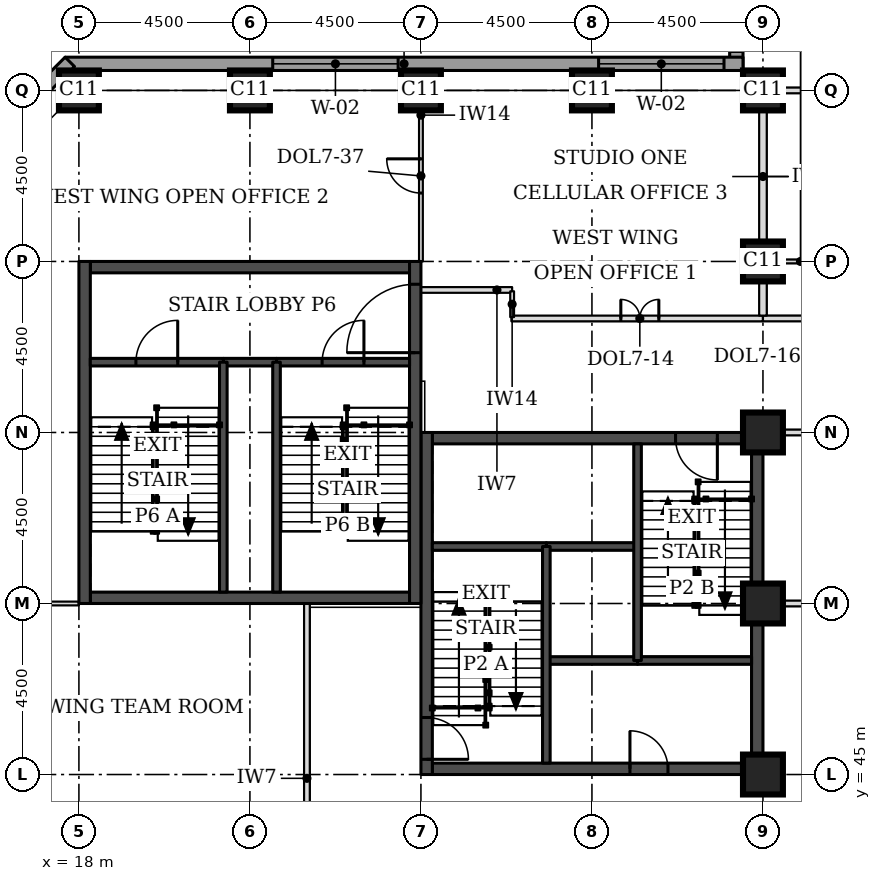
"""IFC4 building model, lengths in metres.
Left out: names, types, materials, properties, quantities, classifications, styles, units other than length and angle.
Written with IfcOpenShell. Run it as: python <this file> out.ifc"""

import sys

from ifc_helpers import new_model, si_unit, direction, frame, frame_2d, origin, origin_2d, place, context, subcontext, project, spatial, rectangle, extrude, element, fill, save


model = new_model("IFC4")
c1 = context("Model", 3, precision=1e-05, world=origin(), true_north=direction((0.0, 1.0)))
c2 = subcontext(c1, "Body", "Model", "MODEL_VIEW")
j1 = project(units=[si_unit("LENGTHUNIT", "METRE"), si_unit("PLANEANGLEUNIT", "RADIAN")], contexts=[c1])
p1 = place(None, origin())
s1 = spatial("IfcSite", under=j1, at=p1, CompositionType="ELEMENT")
p2 = place(p1, origin())
s2 = spatial("IfcBuilding", under=s1, at=p2, CompositionType="ELEMENT")
p3 = place(p2, frame((0.0, 0.0, 134.4)))
s3 = spatial("IfcBuildingStorey", under=s2, at=p3, CompositionType="ELEMENT", Elevation=134.4)
for number, where, z_axis, x_axis in (
    (1, (36.0, 45.0, 0.0), (0.0, 0.0, 1.0), (1.0, 0.0, 0.0)),
    (2, (36.0, 49.5, 0.0), (0.0, 0.0, 1.0), (1.0, 0.0, 0.0)),
    (3, (36.0, 54.0, 0.0), (0.0, 0.0, 1.0), (1.0, 0.0, 0.0)),
    (4, (36.0, 58.5, 0.0), (0.0, 0.0, 1.0), (1.0, 0.0, 0.0)),
    (5, (18.0, 63.0, 0.0), (0.0, 0.0, 1.0), (1.0, 0.0, 0.0)),
    (6, (22.5, 63.0, 0.0), (0.0, 0.0, 1.0), (1.0, 0.0, 0.0)),
    (7, (27.0, 63.0, 0.0), (0.0, 0.0, 1.0), (1.0, 0.0, 0.0)),
    (8, (31.5, 63.0, 0.0), (0.0, 0.0, 1.0), (1.0, 0.0, 0.0)),
    (9, (36.0, 63.0, 0.0), (0.0, 0.0, 1.0), (1.0, 0.0, 0.0)),
):
    element("IfcColumn", number, at=place(p3, frame(where, z_axis=z_axis, x_axis=x_axis)), inside=s3, PredefinedType="COLUMN", context=c2, shape_type="SweptSolid", body=[
        extrude(rectangle(XDim=1.05, YDim=1.05, at=origin_2d()), origin(), (0.0, 0.0, 1.0), 3.7),
    ])
p4 = place(p3, frame((27.3, 45.15, 0.0), z_axis=(0.0, 0.0, 1.0), x_axis=(1.0, 0.0, 0.0)))
e10 = element("IfcWall", 10, at=p4, inside=s3, PredefinedType="SHEAR", context=c2, shape_type="SweptSolid", body=[
    extrude(rectangle(XDim=8.4, YDim=0.3, at=frame_2d((4.2, 0.0))), origin(), (0.0, 0.0, 1.0), 3.7),
])
p5 = place(p4, frame((5.2, 0.0, 0.0)))
e11 = element("IfcOpeningElement", 11, at=p5, cuts=e10, PredefinedType="OPENING", context=c2, shape_type="SweptSolid", body=[
    extrude(rectangle(XDim=1.0, YDim=2.1, at=frame_2d((0.5, 1.05))), frame((0.0, 0.16, 0.0), z_axis=(0.0, -1.0, 0.0), x_axis=(1.0, 0.0, 0.0)), (0.0, 0.0, 1.0), 0.32),
])
p6 = place(p3, frame((27.3, 53.85, 0.0), z_axis=(0.0, 0.0, 1.0), x_axis=(1.0, 0.0, 0.0)))
e12 = element("IfcWall", 12, at=p6, inside=s3, PredefinedType="SHEAR", context=c2, shape_type="SweptSolid", body=[
    extrude(rectangle(XDim=8.4, YDim=0.3, at=frame_2d((4.2, 0.0))), origin(), (0.0, 0.0, 1.0), 3.7),
])
p7 = place(p6, frame((6.4, 0.0, 0.0)))
e13 = element("IfcOpeningElement", 13, at=p7, cuts=e12, PredefinedType="OPENING", context=c2, shape_type="SweptSolid", body=[
    extrude(rectangle(XDim=1.1, YDim=2.1, at=frame_2d((0.55, 1.05))), frame((0.0, 0.16, 0.0), z_axis=(0.0, -1.0, 0.0), x_axis=(1.0, 0.0, 0.0)), (0.0, 0.0, 1.0), 0.32),
])
p8 = place(p3, frame((27.15, 45.0, 0.0), z_axis=(0.0, 0.0, 1.0), x_axis=(0.0, 1.0, 0.0)))
e14 = element("IfcWall", 14, at=p8, inside=s3, PredefinedType="SHEAR", context=c2, shape_type="SweptSolid", body=[
    extrude(rectangle(XDim=9.0, YDim=0.3, at=frame_2d((4.5, 0.0))), origin(), (0.0, 0.0, 1.0), 3.7),
])
p9 = place(p8, frame((0.4, 0.0, 0.0)))
e15 = element("IfcOpeningElement", 15, at=p9, cuts=e14, PredefinedType="OPENING", context=c2, shape_type="SweptSolid", body=[
    extrude(rectangle(XDim=1.1, YDim=2.1, at=frame_2d((0.55, 1.05))), frame((0.0, 0.16, 0.0), z_axis=(0.0, -1.0, 0.0), x_axis=(1.0, 0.0, 0.0)), (0.0, 0.0, 1.0), 0.32),
])
p10 = place(p3, frame((35.85, 45.0, 0.0), z_axis=(0.0, 0.0, 1.0), x_axis=(0.0, 1.0, 0.0)))
e16 = element("IfcWall", 16, at=p10, inside=s3, PredefinedType="SHEAR", context=c2, shape_type="SweptSolid", body=[
    extrude(rectangle(XDim=9.0, YDim=0.3, at=frame_2d((4.5, 0.0))), origin(), (0.0, 0.0, 1.0), 3.7),
])
for number, where, z_axis, x_axis in (
    (17, (18.3, 49.65, 0.0), (0.0, 0.0, 1.0), (1.0, 0.0, 0.0)),
    (18, (18.3, 58.35, 0.0), (0.0, 0.0, 1.0), (1.0, 0.0, 0.0)),
):
    element("IfcWall", number, at=place(p3, frame(where, z_axis=z_axis, x_axis=x_axis)), inside=s3, PredefinedType="SHEAR", context=c2, shape_type="SweptSolid", body=[
        extrude(rectangle(XDim=8.4, YDim=0.3, at=frame_2d((4.2, 0.0))), origin(), (0.0, 0.0, 1.0), 3.7),
    ])
p11 = place(p3, frame((18.15, 49.5, 0.0), z_axis=(0.0, 0.0, 1.0), x_axis=(0.0, 1.0, 0.0)))
e19 = element("IfcWall", 19, at=p11, inside=s3, PredefinedType="SHEAR", context=c2, shape_type="SweptSolid", body=[
    extrude(rectangle(XDim=9.0, YDim=0.3, at=frame_2d((4.5, 0.0))), origin(), (0.0, 0.0, 1.0), 3.7),
])
p12 = place(p3, frame((26.85, 49.5, 0.0), z_axis=(0.0, 0.0, 1.0), x_axis=(0.0, 1.0, 0.0)))
e20 = element("IfcWall", 20, at=p12, inside=s3, PredefinedType="SHEAR", context=c2, shape_type="SweptSolid", body=[
    extrude(rectangle(XDim=9.0, YDim=0.3, at=frame_2d((4.5, 0.0))), origin(), (0.0, 0.0, 1.0), 3.7),
])
p13 = place(p12, frame((6.6, 0.0, 0.0)))
e21 = element("IfcOpeningElement", 21, at=p13, cuts=e20, PredefinedType="OPENING", context=c2, shape_type="SweptSolid", body=[
    extrude(rectangle(XDim=1.8, YDim=2.1, at=frame_2d((0.9, 1.05))), frame((0.0, 0.16, 0.0), z_axis=(0.0, -1.0, 0.0), x_axis=(1.0, 0.0, 0.0)), (0.0, 0.0, 1.0), 0.32),
])
p14 = place(p3, frame((35.3, 76.862, 0.0), z_axis=(0.0, 0.0, 1.0), x_axis=(0.0, -1.0, 0.0)))
e22 = element("IfcWall", 22, at=p14, inside=s3, PredefinedType="STANDARD", context=c2, shape_type="SweptSolid", body=[
    extrude(rectangle(XDim=13.337, YDim=0.35, at=frame_2d((6.669, 0.0))), origin(), (0.0, 0.0, 1.0), 3.525),
])
p15 = place(p14, frame((9.537, 0.0, 0.9)))
e23 = element("IfcOpeningElement", 23, at=p15, cuts=e22, PredefinedType="OPENING", context=c2, shape_type="SweptSolid", body=[
    extrude(rectangle(XDim=3.3, YDim=1.9, at=frame_2d((1.65, 0.95))), frame((0.0, 0.185, 0.0), z_axis=(0.0, -1.0, 0.0), x_axis=(1.0, 0.0, 0.0)), (0.0, 0.0, 1.0), 0.37),
])
p16 = place(p3, frame((35.475, 63.7, 0.0), z_axis=(0.0, 0.0, 1.0), x_axis=(-1.0, 0.0, 0.0)))
e24 = element("IfcWall", 24, at=p16, inside=s3, PredefinedType="STANDARD", context=c2, shape_type="SweptSolid", body=[
    extrude(rectangle(XDim=17.837, YDim=0.35, at=frame_2d((8.919, 0.0))), origin(), (0.0, 0.0, 1.0), 3.525),
])
p17 = place(p16, frame((0.5, 0.0, 0.9)))
e25 = element("IfcOpeningElement", 25, at=p17, cuts=e24, PredefinedType="OPENING", context=c2, shape_type="SweptSolid", body=[
    extrude(rectangle(XDim=3.3, YDim=1.9, at=frame_2d((1.65, 0.95))), frame((0.0, 0.185, 0.0), z_axis=(0.0, -1.0, 0.0), x_axis=(1.0, 0.0, 0.0)), (0.0, 0.0, 1.0), 0.37),
])
p18 = place(p16, frame((9.075, 0.0, 0.9)))
e26 = element("IfcOpeningElement", 26, at=p18, cuts=e24, PredefinedType="OPENING", context=c2, shape_type="SweptSolid", body=[
    extrude(rectangle(XDim=3.3, YDim=1.9, at=frame_2d((1.65, 0.95))), frame((0.0, 0.185, 0.0), z_axis=(0.0, -1.0, 0.0), x_axis=(1.0, 0.0, 0.0)), (0.0, 0.0, 1.0), 0.37),
])
p19 = place(p3, frame((17.761, 63.751, 0.0), z_axis=(0.0, 0.0, 1.0), x_axis=(-0.707106781187, -0.707106781187, 0.0)))
e27 = element("IfcWall", 27, at=p19, inside=s3, PredefinedType="STANDARD", context=c2, shape_type="SweptSolid", body=[
    extrude(rectangle(XDim=7.089, YDim=0.35, at=frame_2d((3.544, 0.0))), origin(), (0.0, 0.0, 1.0), 3.525),
])
p20 = place(p19, frame((1.894, 0.0, 0.9)))
e28 = element("IfcOpeningElement", 28, at=p20, cuts=e27, PredefinedType="OPENING", context=c2, shape_type="SweptSolid", body=[
    extrude(rectangle(XDim=3.3, YDim=1.9, at=frame_2d((1.65, 0.95))), frame((0.0, 0.185, 0.0), z_axis=(0.0, -1.0, 0.0), x_axis=(1.0, 0.0, 0.0)), (0.0, 0.0, 1.0), 0.37),
])
p21 = place(p3, frame((12.749, 44.761, 0.0), z_axis=(0.0, 0.0, 1.0), x_axis=(0.707106781187, -0.707106781187, 0.0)))
e29 = element("IfcWall", 29, at=p21, inside=s3, PredefinedType="STANDARD", context=c2, shape_type="SweptSolid", body=[
    extrude(rectangle(XDim=7.089, YDim=0.35, at=frame_2d((3.544, 0.0))), origin(), (0.0, 0.0, 1.0), 3.525),
])
p22 = place(p21, frame((1.894, 0.0, 0.9)))
e30 = element("IfcOpeningElement", 30, at=p22, cuts=e29, PredefinedType="OPENING", context=c2, shape_type="SweptSolid", body=[
    extrude(rectangle(XDim=3.3, YDim=1.9, at=frame_2d((1.65, 0.95))), frame((0.0, 0.185, 0.0), z_axis=(0.0, -1.0, 0.0), x_axis=(1.0, 0.0, 0.0)), (0.0, 0.0, 1.0), 0.37),
])
for number, where, z_axis, x_axis in (
    (31, (36.525, 49.5, 0.0), (0.0, 0.0, 1.0), (1.0, 0.0, 0.0)),
    (32, (36.525, 54.0, 0.0), (0.0, 0.0, 1.0), (1.0, 0.0, 0.0)),
):
    element("IfcWall", number, at=place(p3, frame(where, z_axis=z_axis, x_axis=x_axis)), inside=s3, PredefinedType="PARTITIONING", context=c2, shape_type="SweptSolid", body=[
        extrude(rectangle(XDim=5.55, YDim=0.15, at=frame_2d((2.775, 0.0))), origin(), (0.0, 0.0, 1.0), 3.55),
    ])
p23 = place(p3, frame((29.38, 57.0, 0.0), z_axis=(0.0, 0.0, 1.0), x_axis=(1.0, 0.0, 0.0)))
e33 = element("IfcWall", 33, at=p23, inside=s3, PredefinedType="PARTITIONING", context=c2, shape_type="SweptSolid", body=[
    extrude(rectangle(XDim=6.62, YDim=0.15, at=frame_2d((3.31, 0.0))), origin(), (0.0, 0.0, 1.0), 3.55),
])
p24 = place(p23, frame((2.88, 0.0, 0.0)))
e34 = element("IfcOpeningElement", 34, at=p24, cuts=e33, PredefinedType="OPENING", context=c2, shape_type="SweptSolid", body=[
    extrude(rectangle(XDim=1.0, YDim=2.1, at=frame_2d((0.5, 1.05))), frame((0.0, 0.085, 0.0), z_axis=(0.0, -1.0, 0.0), x_axis=(1.0, 0.0, 0.0)), (0.0, 0.0, 1.0), 0.17),
])
p25 = place(p3, frame((36.0, 57.0, 0.0), z_axis=(0.0, 0.0, 1.0), x_axis=(1.0, 0.0, 0.0)))
e35 = element("IfcWall", 35, at=p25, inside=s3, PredefinedType="PARTITIONING", context=c2, shape_type="SweptSolid", body=[
    extrude(rectangle(XDim=6.075, YDim=0.15, at=frame_2d((3.038, 0.0))), origin(), (0.0, 0.0, 1.0), 3.55),
])
p26 = place(p25, frame((2.55, 0.0, 0.0)))
e36 = element("IfcOpeningElement", 36, at=p26, cuts=e35, PredefinedType="OPENING", context=c2, shape_type="SweptSolid", body=[
    extrude(rectangle(XDim=1.0, YDim=2.1, at=frame_2d((0.5, 1.05))), frame((0.0, 0.085, 0.0), z_axis=(0.0, -1.0, 0.0), x_axis=(1.0, 0.0, 0.0)), (0.0, 0.0, 1.0), 0.17),
])
p27 = place(p3, frame((36.525, 58.5, 0.0), z_axis=(0.0, 0.0, 1.0), x_axis=(1.0, 0.0, 0.0)))
e37 = element("IfcWall", 37, at=p27, inside=s3, PredefinedType="PARTITIONING", context=c2, shape_type="SweptSolid", body=[
    extrude(rectangle(XDim=2.525, YDim=0.1, at=frame_2d((1.263, 0.0))), origin(), (0.0, 0.0, 1.0), 3.55),
])
p28 = place(p27, frame((0.8, 0.0, 0.0)))
e38 = element("IfcOpeningElement", 38, at=p28, cuts=e37, PredefinedType="OPENING", context=c2, shape_type="SweptSolid", body=[
    extrude(rectangle(XDim=0.9, YDim=2.1, at=frame_2d((0.45, 1.05))), frame((0.0, 0.06, 0.0), z_axis=(0.0, -1.0, 0.0), x_axis=(1.0, 0.0, 0.0)), (0.0, 0.0, 1.0), 0.12),
])
p29 = place(p3, frame((36.525, 63.0, 0.0), z_axis=(0.0, 0.0, 1.0), x_axis=(1.0, 0.0, 0.0)))
e39 = element("IfcWall", 39, at=p29, inside=s3, PredefinedType="PARTITIONING", context=c2, shape_type="SweptSolid", body=[
    extrude(rectangle(XDim=2.4, YDim=0.15, at=frame_2d((1.2, 0.0))), origin(), (0.0, 0.0, 1.0), 3.55),
])
p30 = place(p3, frame((24.0, 43.5, 0.0), z_axis=(0.0, 0.0, 1.0), x_axis=(0.0, 1.0, 0.0)))
e40 = element("IfcWall", 40, at=p30, inside=s3, PredefinedType="PARTITIONING", context=c2, shape_type="SweptSolid", body=[
    extrude(rectangle(XDim=6.0, YDim=0.15, at=frame_2d((3.0, 0.0))), origin(), (0.0, 0.0, 1.0), 3.55),
])
p31 = place(p3, frame((36.0, 57.075, 0.0), z_axis=(0.0, 0.0, 1.0), x_axis=(0.0, 1.0, 0.0)))
e41 = element("IfcWall", 41, at=p31, inside=s3, PredefinedType="PARTITIONING", context=c2, shape_type="SweptSolid", body=[
    extrude(rectangle(XDim=0.9, YDim=0.2, at=frame_2d((0.45, 0.0))), origin(), (0.0, 0.0, 1.0), 2.8),
])
p32 = place(p3, frame((36.0, 58.995, 0.0), z_axis=(0.0, 0.0, 1.0), x_axis=(0.0, 1.0, 0.0)))
e42 = element("IfcWall", 42, at=p32, inside=s3, PredefinedType="PARTITIONING", context=c2, shape_type="SweptSolid", body=[
    extrude(rectangle(XDim=3.48, YDim=0.2, at=frame_2d((1.74, 0.0))), origin(), (0.0, 0.0, 1.0), 2.8),
])
p33 = place(p3, frame((27.0, 63.0, 0.0), z_axis=(0.0, 0.0, 1.0), x_axis=(0.0, -1.0, 0.0)))
e43 = element("IfcWall", 43, at=p33, inside=s3, PredefinedType="PARTITIONING", context=c2, shape_type="SweptSolid", body=[
    extrude(rectangle(XDim=4.5, YDim=0.1, at=frame_2d((2.25, 0.0))), origin(), (0.0, 0.0, 1.0), 3.55),
])
p34 = place(p33, frame((1.8, 0.0, 0.0)))
e44 = element("IfcOpeningElement", 44, at=p34, cuts=e43, PredefinedType="OPENING", context=c2, shape_type="SweptSolid", body=[
    extrude(rectangle(XDim=0.9, YDim=2.1, at=frame_2d((0.45, 1.05))), frame((0.0, 0.06, 0.0), z_axis=(0.0, -1.0, 0.0), x_axis=(1.0, 0.0, 0.0)), (0.0, 0.0, 1.0), 0.12),
])
p35 = place(p3, frame((13.5, 49.5, 0.0), z_axis=(0.0, 0.0, 1.0), x_axis=(1.0, 0.0, 0.0)))
e45 = element("IfcWall", 45, at=p35, inside=s3, PredefinedType="PARTITIONING", context=c2, shape_type="SweptSolid", body=[
    extrude(rectangle(XDim=4.5, YDim=0.1, at=frame_2d((2.25, 0.0))), origin(), (0.0, 0.0, 1.0), 3.55),
])
p36 = place(p35, frame((1.8, 0.0, 0.0)))
e46 = element("IfcOpeningElement", 46, at=p36, cuts=e45, PredefinedType="OPENING", context=c2, shape_type="SweptSolid", body=[
    extrude(rectangle(XDim=0.9, YDim=2.1, at=frame_2d((0.45, 1.05))), frame((0.0, 0.06, 0.0), z_axis=(0.0, -1.0, 0.0), x_axis=(1.0, 0.0, 0.0)), (0.0, 0.0, 1.0), 0.12),
])
p37 = place(p3, frame((27.0, 57.75, 0.0), z_axis=(0.0, 0.0, 1.0), x_axis=(1.0, 0.0, 0.0)))
e47 = element("IfcWall", 47, at=p37, inside=s3, PredefinedType="PARTITIONING", context=c2, shape_type="SweptSolid", body=[
    extrude(rectangle(XDim=2.4, YDim=0.15, at=frame_2d((1.2, 0.0))), origin(), (0.0, 0.0, 1.0), 3.55),
])
p38 = place(p3, frame((29.4, 57.715, 0.0), z_axis=(0.0, 0.0, 1.0), x_axis=(0.0, -1.0, 0.0)))
e48 = element("IfcWall", 48, at=p38, inside=s3, PredefinedType="PARTITIONING", context=c2, shape_type="SweptSolid", body=[
    extrude(rectangle(XDim=0.68, YDim=0.1, at=frame_2d((0.34, 0.0))), origin(), (0.0, 0.0, 1.0), 3.55),
])
p39 = place(p3, frame((30.3, 48.0, 0.0), z_axis=(0.0, 0.0, 1.0), x_axis=(1.0, 0.0, 0.0)))
e49 = element("IfcWall", 49, at=p39, inside=s3, PredefinedType="SOLIDWALL", context=c2, shape_type="SweptSolid", body=[
    extrude(rectangle(XDim=2.4, YDim=0.2, at=frame_2d((1.2, 0.0))), origin(), (0.0, 0.0, 1.0), 3.55),
])
p40 = place(p3, frame((32.7, 48.0, 0.0), z_axis=(0.0, 0.0, 1.0), x_axis=(1.0, 0.0, 0.0)))
e50 = element("IfcWall", 50, at=p40, inside=s3, PredefinedType="SOLIDWALL", context=c2, shape_type="SweptSolid", body=[
    extrude(rectangle(XDim=3.0, YDim=0.2, at=frame_2d((1.5, 0.0))), origin(), (0.0, 0.0, 1.0), 3.55),
])
p41 = place(p3, frame((30.3, 51.0, 0.0), z_axis=(0.0, 0.0, 1.0), x_axis=(1.0, 0.0, 0.0)))
e51 = element("IfcWall", 51, at=p41, inside=s3, PredefinedType="SOLIDWALL", context=c2, shape_type="SweptSolid", body=[
    extrude(rectangle(XDim=2.4, YDim=0.2, at=frame_2d((1.2, 0.0))), origin(), (0.0, 0.0, 1.0), 3.7),
])
p42 = place(p3, frame((27.3, 51.0, 0.0), z_axis=(0.0, 0.0, 1.0), x_axis=(1.0, 0.0, 0.0)))
e52 = element("IfcWall", 52, at=p42, inside=s3, PredefinedType="SOLIDWALL", context=c2, shape_type="SweptSolid", body=[
    extrude(rectangle(XDim=3.0, YDim=0.2, at=frame_2d((1.5, 0.0))), origin(), (0.0, 0.0, 1.0), 3.55),
])
for number, where, z_axis, x_axis in (
    (53, (30.3, 45.3, 0.0), (0.0, 0.0, 1.0), (0.0, 1.0, 0.0)),
    (54, (32.7, 48.0, 0.0), (0.0, 0.0, 1.0), (0.0, 1.0, 0.0)),
):
    element("IfcWall", number, at=place(p3, frame(where, z_axis=z_axis, x_axis=x_axis)), inside=s3, PredefinedType="SOLIDWALL", context=c2, shape_type="SweptSolid", body=[
        extrude(rectangle(XDim=5.7, YDim=0.2, at=frame_2d((2.85, 0.0))), origin(), (0.0, 0.0, 1.0), 3.55),
    ])
p43 = place(p3, frame((21.8, 55.85, 0.0), z_axis=(0.0, 0.0, 1.0), x_axis=(1.0, 0.0, 0.0)))
e55 = element("IfcWall", 55, at=p43, inside=s3, PredefinedType="SOLIDWALL", context=c2, shape_type="SweptSolid", body=[
    extrude(rectangle(XDim=1.4, YDim=0.2, at=frame_2d((0.7, 0.0))), origin(), (0.0, 0.0, 1.0), 3.55),
])
p44 = place(p3, frame((18.3, 55.85, 0.0), z_axis=(0.0, 0.0, 1.0), x_axis=(1.0, 0.0, 0.0)))
e56 = element("IfcWall", 56, at=p44, inside=s3, PredefinedType="SOLIDWALL", context=c2, shape_type="SweptSolid", body=[
    extrude(rectangle(XDim=3.5, YDim=0.2, at=frame_2d((1.75, 0.0))), origin(), (0.0, 0.0, 1.0), 3.55),
])
p45 = place(p44, frame((1.2, 0.0, 0.0)))
e57 = element("IfcOpeningElement", 57, at=p45, cuts=e56, PredefinedType="OPENING", context=c2, shape_type="SweptSolid", body=[
    extrude(rectangle(XDim=1.1, YDim=2.1, at=frame_2d((0.55, 1.05))), frame((0.0, 0.11, 0.0), z_axis=(0.0, -1.0, 0.0), x_axis=(1.0, 0.0, 0.0)), (0.0, 0.0, 1.0), 0.22),
])
p46 = place(p3, frame((23.2, 55.85, 0.0), z_axis=(0.0, 0.0, 1.0), x_axis=(1.0, 0.0, 0.0)))
e58 = element("IfcWall", 58, at=p46, inside=s3, PredefinedType="SOLIDWALL", context=c2, shape_type="SweptSolid", body=[
    extrude(rectangle(XDim=3.5, YDim=0.2, at=frame_2d((1.75, 0.0))), origin(), (0.0, 0.0, 1.0), 3.55),
])
p47 = place(p46, frame((1.2, 0.0, 0.0)))
e59 = element("IfcOpeningElement", 59, at=p47, cuts=e58, PredefinedType="OPENING", context=c2, shape_type="SweptSolid", body=[
    extrude(rectangle(XDim=1.1, YDim=2.1, at=frame_2d((0.55, 1.05))), frame((0.0, 0.11, 0.0), z_axis=(0.0, -1.0, 0.0), x_axis=(1.0, 0.0, 0.0)), (0.0, 0.0, 1.0), 0.22),
])
for number, where, z_axis, x_axis in (
    (60, (21.8, 49.8, 0.0), (0.0, 0.0, 1.0), (0.0, 1.0, 0.0)),
    (61, (23.2, 49.8, 0.0), (0.0, 0.0, 1.0), (0.0, 1.0, 0.0)),
):
    element("IfcWall", number, at=place(p3, frame(where, z_axis=z_axis, x_axis=x_axis)), inside=s3, PredefinedType="SOLIDWALL", context=c2, shape_type="SweptSolid", body=[
        extrude(rectangle(XDim=6.05, YDim=0.2, at=frame_2d((3.025, 0.0))), origin(), (0.0, 0.0, 1.0), 3.55),
    ])
p48 = place(p17, origin())
e62 = element("IfcWindow", 62, at=p48, inside=s3, PartitioningType="SINGLE_PANEL", PredefinedType="WINDOW", context=c2, shape_type="SweptSolid", body=[
    extrude(rectangle(XDim=3.3, YDim=1.9, at=frame_2d((1.65, 0.95))), frame((0.0, 0.085, 0.0), z_axis=(0.0, -1.0, 0.0), x_axis=(1.0, 0.0, 0.0)), (0.0, 0.0, 1.0), 0.06),
])
fill(e25, e62)
p49 = place(p18, origin())
e63 = element("IfcWindow", 63, at=p49, inside=s3, PartitioningType="SINGLE_PANEL", PredefinedType="WINDOW", context=c2, shape_type="SweptSolid", body=[
    extrude(rectangle(XDim=3.3, YDim=1.9, at=frame_2d((1.65, 0.95))), frame((0.0, 0.085, 0.0), z_axis=(0.0, -1.0, 0.0), x_axis=(1.0, 0.0, 0.0)), (0.0, 0.0, 1.0), 0.06),
])
fill(e26, e63)
p50 = place(p24, origin())
e64 = element("IfcDoor", 64, at=p50, inside=s3, OperationType="DOUBLE_DOOR_SINGLE_SWING", PredefinedType="DOOR", context=c2, shape_type="SweptSolid", body=[
    extrude(rectangle(XDim=1.0, YDim=2.1, at=frame_2d((0.5, 1.05))), frame((0.0, 0.025, 0.0), z_axis=(0.0, -1.0, 0.0), x_axis=(1.0, 0.0, 0.0)), (0.0, 0.0, 1.0), 0.05),
])
fill(e34, e64)
p51 = place(p34, frame((0.9, 0.0, 0.0), z_axis=(0.0, 0.0, 1.0), x_axis=(-1.0, 0.0, 0.0)))
e65 = element("IfcDoor", 65, at=p51, inside=s3, OperationType="SINGLE_SWING_RIGHT", PredefinedType="DOOR", context=c2, shape_type="SweptSolid", body=[
    extrude(rectangle(XDim=0.9, YDim=2.1, at=frame_2d((0.45, 1.05))), frame((0.0, 0.025, 0.0), z_axis=(0.0, -1.0, 0.0), x_axis=(1.0, 0.0, 0.0)), (0.0, 0.0, 1.0), 0.05),
])
fill(e44, e65)
p52 = place(p9, frame((1.1, 0.0, 0.0), z_axis=(0.0, 0.0, 1.0), x_axis=(-1.0, 0.0, 0.0)))
e66 = element("IfcDoor", 66, at=p52, inside=s3, OperationType="SINGLE_SWING_RIGHT", PredefinedType="DOOR", context=c2, shape_type="SweptSolid", body=[
    extrude(rectangle(XDim=1.1, YDim=2.1, at=frame_2d((0.55, 1.05))), frame((0.0, 0.025, 0.0), z_axis=(0.0, -1.0, 0.0), x_axis=(1.0, 0.0, 0.0)), (0.0, 0.0, 1.0), 0.05),
])
fill(e15, e66)
p53 = place(p7, frame((1.1, 0.0, 0.0), z_axis=(0.0, 0.0, 1.0), x_axis=(-1.0, 0.0, 0.0)))
e67 = element("IfcDoor", 67, at=p53, inside=s3, OperationType="SINGLE_SWING_LEFT", PredefinedType="DOOR", context=c2, shape_type="SweptSolid", body=[
    extrude(rectangle(XDim=1.1, YDim=2.1, at=frame_2d((0.55, 1.05))), frame((0.0, 0.025, 0.0), z_axis=(0.0, -1.0, 0.0), x_axis=(1.0, 0.0, 0.0)), (0.0, 0.0, 1.0), 0.05),
])
fill(e13, e67)
p54 = place(p5, origin())
e68 = element("IfcDoor", 68, at=p54, inside=s3, OperationType="SINGLE_SWING_LEFT", PredefinedType="DOOR", context=c2, shape_type="SweptSolid", body=[
    extrude(rectangle(XDim=1.0, YDim=2.1, at=frame_2d((0.5, 1.05))), frame((0.0, 0.025, 0.0), z_axis=(0.0, -1.0, 0.0), x_axis=(1.0, 0.0, 0.0)), (0.0, 0.0, 1.0), 0.05),
])
fill(e11, e68)
p55 = place(p45, origin())
e69 = element("IfcDoor", 69, at=p55, inside=s3, OperationType="SINGLE_SWING_RIGHT", PredefinedType="DOOR", context=c2, shape_type="SweptSolid", body=[
    extrude(rectangle(XDim=1.1, YDim=2.1, at=frame_2d((0.55, 1.05))), frame((0.0, 0.025, 0.0), z_axis=(0.0, -1.0, 0.0), x_axis=(1.0, 0.0, 0.0)), (0.0, 0.0, 1.0), 0.05),
])
fill(e57, e69)
p56 = place(p47, origin())
e70 = element("IfcDoor", 70, at=p56, inside=s3, OperationType="SINGLE_SWING_RIGHT", PredefinedType="DOOR", context=c2, shape_type="SweptSolid", body=[
    extrude(rectangle(XDim=1.1, YDim=2.1, at=frame_2d((0.55, 1.05))), frame((0.0, 0.025, 0.0), z_axis=(0.0, -1.0, 0.0), x_axis=(1.0, 0.0, 0.0)), (0.0, 0.0, 1.0), 0.05),
])
fill(e59, e70)
p57 = place(p13, origin())
e71 = element("IfcDoor", 71, at=p57, inside=s3, OperationType="SINGLE_SWING_LEFT", PredefinedType="DOOR", context=c2, shape_type="SweptSolid", body=[
    extrude(rectangle(XDim=1.8, YDim=2.1, at=frame_2d((0.9, 1.05))), frame((0.0, 0.025, 0.0), z_axis=(0.0, -1.0, 0.0), x_axis=(1.0, 0.0, 0.0)), (0.0, 0.0, 1.0), 0.05),
])
fill(e21, e71)
save(model, sys.argv[1])
